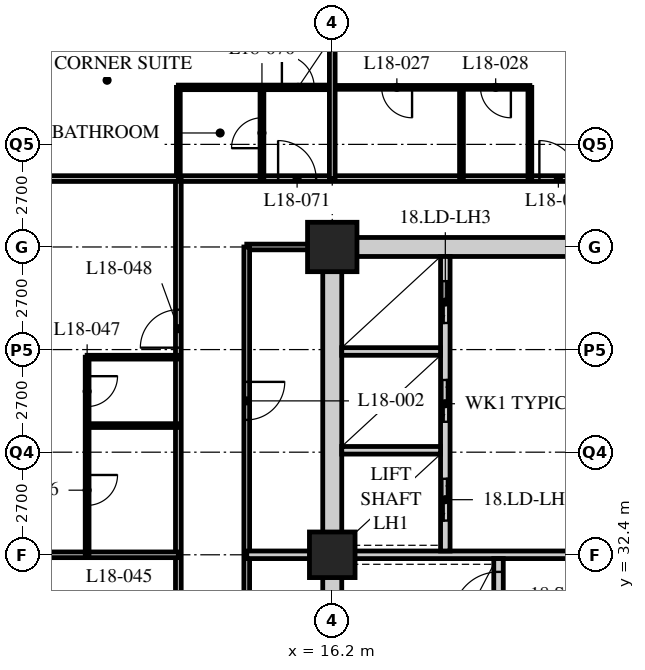
"""IFC4 building model, lengths in metres.
Left out: names, types, materials, properties, quantities, classifications, styles, units other than length and angle.
Written with IfcOpenShell. Run it as: python <this file> out.ifc"""

import sys

from ifc_helpers import new_model, si_unit, direction, frame, frame_2d, origin, origin_2d, place, context, subcontext, project, spatial, rectangle, hollow_rectangle, extrude, element, fill, save


model = new_model("IFC4")
c1 = context("Model", 3, precision=1e-05, world=origin(), true_north=direction((0.0, 1.0)))
c2 = subcontext(c1, "Body", "Model", "MODEL_VIEW")
j1 = project(units=[si_unit("LENGTHUNIT", "METRE"), si_unit("PLANEANGLEUNIT", "RADIAN")], contexts=[c1])
p1 = place(None, origin())
s1 = spatial("IfcSite", under=j1, at=p1, CompositionType="ELEMENT")
p2 = place(p1, origin())
s2 = spatial("IfcBuilding", under=s1, at=p2, CompositionType="ELEMENT")
p3 = place(p2, frame((0.0, 0.0, 73.8)))
s3 = spatial("IfcBuildingStorey", under=s2, at=p3, CompositionType="ELEMENT", Elevation=73.8)
p4 = place(p3, frame((16.2, 32.4, 0.0), z_axis=(0.0, 0.0, 1.0), x_axis=(1.0, 0.0, 0.0)))
e1 = element("IfcColumn", 1, at=p4, inside=s3, PredefinedType="COLUMN", context=c2, shape_type="SweptSolid", body=[
    extrude(hollow_rectangle(XDim=1.2, YDim=1.2, WallThickness=0.12, at=origin_2d()), origin(), (0.0, 0.0, 1.0), 3.4),
])
p5 = place(p3, frame((16.2, 40.5, 0.0), z_axis=(0.0, 0.0, 1.0), x_axis=(1.0, 0.0, 0.0)))
e2 = element("IfcColumn", 2, at=p5, inside=s3, PredefinedType="COLUMN", context=c2, shape_type="SweptSolid", body=[
    extrude(hollow_rectangle(XDim=1.3, YDim=1.3, WallThickness=0.13, at=origin_2d()), origin(), (0.0, 0.0, 1.0), 3.4),
])
p6 = place(p3, frame((12.15, 42.3, 0.0), z_axis=(0.0, 0.0, 1.0), x_axis=(1.0, 0.0, 0.0)))
e3 = element("IfcWall", 3, at=p6, inside=s3, PredefinedType="PARTITIONING", context=c2, shape_type="SweptSolid", body=[
    extrude(rectangle(XDim=36.45, YDim=0.15, at=frame_2d((18.225, 0.0))), origin(), (0.0, 0.0, 1.0), 3.19),
])
p7 = place(p6, frame((9.5, 0.0, 0.0)))
e4 = element("IfcOpeningElement", 4, at=p7, cuts=e3, PredefinedType="OPENING", context=c2, shape_type="SweptSolid", body=[
    extrude(rectangle(XDim=1.0, YDim=2.1, at=frame_2d((0.5, 1.05))), frame((0.0, 0.085, 0.0), z_axis=(0.0, -1.0, 0.0), x_axis=(1.0, 0.0, 0.0)), (0.0, 0.0, 1.0), 0.17),
])
p8 = place(p6, frame((17.6, 0.0, 0.0)))
e5 = element("IfcOpeningElement", 5, at=p8, cuts=e3, PredefinedType="OPENING", context=c2, shape_type="SweptSolid", body=[
    extrude(rectangle(XDim=1.0, YDim=2.1, at=frame_2d((0.5, 1.05))), frame((0.0, 0.085, 0.0), z_axis=(0.0, -1.0, 0.0), x_axis=(1.0, 0.0, 0.0)), (0.0, 0.0, 1.0), 0.17),
])
p9 = place(p6, frame((22.7, 0.0, 0.0)))
e6 = element("IfcOpeningElement", 6, at=p9, cuts=e3, PredefinedType="OPENING", context=c2, shape_type="SweptSolid", body=[
    extrude(rectangle(XDim=1.0, YDim=2.1, at=frame_2d((0.5, 1.05))), frame((0.0, 0.085, 0.0), z_axis=(0.0, -1.0, 0.0), x_axis=(1.0, 0.0, 0.0)), (0.0, 0.0, 1.0), 0.17),
])
p10 = place(p6, frame((26.75, 0.0, 0.0)))
e7 = element("IfcOpeningElement", 7, at=p10, cuts=e3, PredefinedType="OPENING", context=c2, shape_type="SweptSolid", body=[
    extrude(rectangle(XDim=1.0, YDim=2.1, at=frame_2d((0.5, 1.05))), frame((0.0, 0.085, 0.0), z_axis=(0.0, -1.0, 0.0), x_axis=(1.0, 0.0, 0.0)), (0.0, 0.0, 1.0), 0.17),
])
p11 = place(p6, frame((30.8, 0.0, 0.0)))
e8 = element("IfcOpeningElement", 8, at=p11, cuts=e3, PredefinedType="OPENING", context=c2, shape_type="SweptSolid", body=[
    extrude(rectangle(XDim=1.0, YDim=2.1, at=frame_2d((0.5, 1.05))), frame((0.0, 0.085, 0.0), z_axis=(0.0, -1.0, 0.0), x_axis=(1.0, 0.0, 0.0)), (0.0, 0.0, 1.0), 0.17),
])
p12 = place(p6, frame((32.825, 0.0, 0.0)))
e9 = element("IfcOpeningElement", 9, at=p12, cuts=e3, PredefinedType="OPENING", context=c2, shape_type="SweptSolid", body=[
    extrude(rectangle(XDim=1.0, YDim=2.1, at=frame_2d((0.5, 1.05))), frame((0.0, 0.085, 0.0), z_axis=(0.0, -1.0, 0.0), x_axis=(1.0, 0.0, 0.0)), (0.0, 0.0, 1.0), 0.17),
])
p13 = place(p6, frame((2.625, 0.0, 0.0)))
e10 = element("IfcOpeningElement", 10, at=p13, cuts=e3, PredefinedType="OPENING", context=c2, shape_type="SweptSolid", body=[
    extrude(rectangle(XDim=1.0, YDim=2.1, at=frame_2d((0.5, 1.05))), frame((0.0, 0.085, 0.0), z_axis=(0.0, -1.0, 0.0), x_axis=(1.0, 0.0, 0.0)), (0.0, 0.0, 1.0), 0.17),
])
p14 = place(p3, frame((12.15, 16.2, 0.0), z_axis=(0.0, 0.0, 1.0), x_axis=(0.0, 1.0, 0.0)))
e11 = element("IfcWall", 11, at=p14, inside=s3, PredefinedType="PARTITIONING", context=c2, shape_type="SweptSolid", body=[
    extrude(rectangle(XDim=26.1, YDim=0.15, at=frame_2d((13.05, 0.0))), origin(), (0.0, 0.0, 1.0), 3.19),
])
p15 = place(p14, frame((0.3, 0.0, 0.0)))
e12 = element("IfcOpeningElement", 12, at=p15, cuts=e11, PredefinedType="OPENING", context=c2, shape_type="SweptSolid", body=[
    extrude(rectangle(XDim=1.0, YDim=2.1, at=frame_2d((0.5, 1.05))), frame((0.0, 0.085, 0.0), z_axis=(0.0, -1.0, 0.0), x_axis=(1.0, 0.0, 0.0)), (0.0, 0.0, 1.0), 0.17),
])
p16 = place(p14, frame((6.5, 0.0, 0.0)))
e13 = element("IfcOpeningElement", 13, at=p16, cuts=e11, PredefinedType="OPENING", context=c2, shape_type="SweptSolid", body=[
    extrude(rectangle(XDim=1.0, YDim=2.1, at=frame_2d((0.5, 1.05))), frame((0.0, 0.085, 0.0), z_axis=(0.0, -1.0, 0.0), x_axis=(1.0, 0.0, 0.0)), (0.0, 0.0, 1.0), 0.17),
])
p17 = place(p14, frame((13.55, 0.0, 0.0)))
e14 = element("IfcOpeningElement", 14, at=p17, cuts=e11, PredefinedType="OPENING", context=c2, shape_type="SweptSolid", body=[
    extrude(rectangle(XDim=1.0, YDim=2.1, at=frame_2d((0.5, 1.05))), frame((0.0, 0.085, 0.0), z_axis=(0.0, -1.0, 0.0), x_axis=(1.0, 0.0, 0.0)), (0.0, 0.0, 1.0), 0.17),
])
p18 = place(p14, frame((21.65, 0.0, 0.0)))
e15 = element("IfcOpeningElement", 15, at=p18, cuts=e11, PredefinedType="OPENING", context=c2, shape_type="SweptSolid", body=[
    extrude(rectangle(XDim=1.0, YDim=2.1, at=frame_2d((0.5, 1.05))), frame((0.0, 0.085, 0.0), z_axis=(0.0, -1.0, 0.0), x_axis=(1.0, 0.0, 0.0)), (0.0, 0.0, 1.0), 0.17),
])
p19 = place(p3, frame((16.0, 40.5, 0.0), z_axis=(0.0, 0.0, 1.0), x_axis=(-1.0, 0.0, 0.0)))
e16 = element("IfcWall", 16, at=p19, inside=s3, PredefinedType="PARTITIONING", context=c2, shape_type="SweptSolid", body=[
    extrude(rectangle(XDim=2.05, YDim=0.15, at=frame_2d((1.025, 0.0))), origin(), (0.0, 0.0, 1.0), 2.578),
])
p20 = place(p3, frame((13.95, 40.5, 0.0), z_axis=(0.0, 0.0, 1.0), x_axis=(0.0, -1.0, 0.0)))
e17 = element("IfcWall", 17, at=p20, inside=s3, PredefinedType="PARTITIONING", context=c2, shape_type="SweptSolid", body=[
    extrude(rectangle(XDim=22.5, YDim=0.15, at=frame_2d((11.25, 0.0))), origin(), (0.0, 0.0, 1.0), 3.19),
])
p21 = place(p20, frame((11.65, 0.0, 0.0)))
e18 = element("IfcOpeningElement", 18, at=p21, cuts=e17, PredefinedType="OPENING", context=c2, shape_type="SweptSolid", body=[
    extrude(rectangle(XDim=1.0, YDim=2.1, at=frame_2d((0.5, 1.05))), frame((0.0, 0.085, 0.0), z_axis=(0.0, -1.0, 0.0), x_axis=(1.0, 0.0, 0.0)), (0.0, 0.0, 1.0), 0.17),
])
p22 = place(p20, frame((3.55, 0.0, 0.0)))
e19 = element("IfcOpeningElement", 19, at=p22, cuts=e17, PredefinedType="OPENING", context=c2, shape_type="SweptSolid", body=[
    extrude(rectangle(XDim=1.0, YDim=2.1, at=frame_2d((0.5, 1.05))), frame((0.0, 0.085, 0.0), z_axis=(0.0, -1.0, 0.0), x_axis=(1.0, 0.0, 0.0)), (0.0, 0.0, 1.0), 0.17),
])
p23 = place(p3, frame((13.95, 32.4, 0.0), z_axis=(0.0, 0.0, 1.0), x_axis=(1.0, 0.0, 0.0)))
e20 = element("IfcWall", 20, at=p23, inside=s3, PredefinedType="SOLIDWALL", context=c2, shape_type="SweptSolid", body=[
    extrude(rectangle(XDim=2.25, YDim=0.2, at=frame_2d((1.125, 0.0))), origin(), (0.0, 0.0, 1.0), 2.578),
])
p24 = place(p3, frame((16.2, 44.7, 0.0), z_axis=(0.0, 0.0, 1.0), x_axis=(1.0, 0.0, 0.0)))
e21 = element("IfcWall", 21, at=p24, inside=s3, PredefinedType="PARTITIONING", context=c2, shape_type="SweptSolid", body=[
    extrude(rectangle(XDim=5.2, YDim=0.1, at=frame_2d((2.6, 0.0))), origin(), (0.0, 0.0, 1.0), 3.19),
])
p25 = place(p24, frame((1.3, 0.0, 0.0)))
e22 = element("IfcOpeningElement", 22, at=p25, cuts=e21, PredefinedType="OPENING", context=c2, shape_type="SweptSolid", body=[
    extrude(rectangle(XDim=0.8, YDim=2.1, at=frame_2d((0.4, 1.05))), frame((0.0, 0.06, 0.0), z_axis=(0.0, -1.0, 0.0), x_axis=(1.0, 0.0, 0.0)), (0.0, 0.0, 1.0), 0.12),
])
p26 = place(p24, frame((3.9, 0.0, 0.0)))
e23 = element("IfcOpeningElement", 23, at=p26, cuts=e21, PredefinedType="OPENING", context=c2, shape_type="SweptSolid", body=[
    extrude(rectangle(XDim=0.8, YDim=2.1, at=frame_2d((0.4, 1.05))), frame((0.0, 0.06, 0.0), z_axis=(0.0, -1.0, 0.0), x_axis=(1.0, 0.0, 0.0)), (0.0, 0.0, 1.0), 0.12),
])
for number, where, z_axis, x_axis in (
    (24, (19.6, 42.3, 0.0), (0.0, 0.0, 1.0), (0.0, 1.0, 0.0)),
    (25, (21.4, 42.3, 0.0), (0.0, 0.0, 1.0), (0.0, 1.0, 0.0)),
):
    element("IfcWall", number, at=place(p3, frame(where, z_axis=z_axis, x_axis=x_axis)), inside=s3, PredefinedType="PARTITIONING", context=c2, shape_type="SweptSolid", body=[
        extrude(rectangle(XDim=2.4, YDim=0.1, at=frame_2d((1.2, 0.0))), origin(), (0.0, 0.0, 1.0), 3.19),
    ])
p27 = place(p3, frame((12.15, 32.4, 0.0), z_axis=(0.0, 0.0, 1.0), x_axis=(-1.0, 0.0, 0.0)))
e26 = element("IfcWall", 26, at=p27, inside=s3, PredefinedType="PARTITIONING", context=c2, shape_type="SweptSolid", body=[
    extrude(rectangle(XDim=11.85, YDim=0.15, at=frame_2d((5.925, 0.0))), origin(), (0.0, 0.0, 1.0), 2.578),
])
p28 = place(p3, frame((9.75, 32.4, 0.0), z_axis=(0.0, 0.0, 1.0), x_axis=(0.0, 1.0, 0.0)))
e27 = element("IfcWall", 27, at=p28, inside=s3, PredefinedType="PARTITIONING", context=c2, shape_type="SweptSolid", body=[
    extrude(rectangle(XDim=5.2, YDim=0.1, at=frame_2d((2.6, 0.0))), origin(), (0.0, 0.0, 1.0), 3.19),
])
p29 = place(p28, frame((1.3, 0.0, 0.0)))
e28 = element("IfcOpeningElement", 28, at=p29, cuts=e27, PredefinedType="OPENING", context=c2, shape_type="SweptSolid", body=[
    extrude(rectangle(XDim=0.8, YDim=2.1, at=frame_2d((0.4, 1.05))), frame((0.0, 0.06, 0.0), z_axis=(0.0, -1.0, 0.0), x_axis=(1.0, 0.0, 0.0)), (0.0, 0.0, 1.0), 0.12),
])
p30 = place(p28, frame((3.9, 0.0, 0.0)))
e29 = element("IfcOpeningElement", 29, at=p30, cuts=e27, PredefinedType="OPENING", context=c2, shape_type="SweptSolid", body=[
    extrude(rectangle(XDim=0.8, YDim=2.1, at=frame_2d((0.4, 1.05))), frame((0.0, 0.06, 0.0), z_axis=(0.0, -1.0, 0.0), x_axis=(1.0, 0.0, 0.0)), (0.0, 0.0, 1.0), 0.12),
])
for number, where, z_axis, x_axis in (
    (30, (12.15, 35.8, 0.0), (0.0, 0.0, 1.0), (-1.0, 0.0, 0.0)),
    (31, (12.15, 37.6, 0.0), (0.0, 0.0, 1.0), (-1.0, 0.0, 0.0)),
):
    element("IfcWall", number, at=place(p3, frame(where, z_axis=z_axis, x_axis=x_axis)), inside=s3, PredefinedType="PARTITIONING", context=c2, shape_type="SweptSolid", body=[
        extrude(rectangle(XDim=2.4, YDim=0.1, at=frame_2d((1.2, 0.0))), origin(), (0.0, 0.0, 1.0), 3.19),
    ])
p31 = place(p3, frame((12.15, 44.7, 0.0), z_axis=(0.0, 0.0, 1.0), x_axis=(1.0, 0.0, 0.0)))
e32 = element("IfcWall", 32, at=p31, inside=s3, PredefinedType="PARTITIONING", context=c2, shape_type="SweptSolid", body=[
    extrude(rectangle(XDim=4.05, YDim=0.12, at=frame_2d((2.025, 0.0))), origin(), (0.0, 0.0, 1.0), 3.19),
])
p32 = place(p31, frame((2.725, 0.0, 0.0)))
e33 = element("IfcOpeningElement", 33, at=p32, cuts=e32, PredefinedType="OPENING", context=c2, shape_type="SweptSolid", body=[
    extrude(rectangle(XDim=0.85, YDim=2.1, at=frame_2d((0.425, 1.05))), frame((0.0, 0.07, 0.0), z_axis=(0.0, -1.0, 0.0), x_axis=(1.0, 0.0, 0.0)), (0.0, 0.0, 1.0), 0.14),
])
p33 = place(p3, frame((14.35, 42.3, 0.0), z_axis=(0.0, 0.0, 1.0), x_axis=(0.0, 1.0, 0.0)))
e34 = element("IfcWall", 34, at=p33, inside=s3, PredefinedType="PARTITIONING", context=c2, shape_type="SweptSolid", body=[
    extrude(rectangle(XDim=2.4, YDim=0.1, at=frame_2d((1.2, 0.0))), origin(), (0.0, 0.0, 1.0), 3.19),
])
p34 = place(p33, frame((0.8, 0.0, 0.0)))
e35 = element("IfcOpeningElement", 35, at=p34, cuts=e34, PredefinedType="OPENING", context=c2, shape_type="SweptSolid", body=[
    extrude(rectangle(XDim=0.8, YDim=2.1, at=frame_2d((0.4, 1.05))), frame((0.0, 0.06, 0.0), z_axis=(0.0, -1.0, 0.0), x_axis=(1.0, 0.0, 0.0)), (0.0, 0.0, 1.0), 0.12),
])
p35 = place(p3, frame((12.15, 42.3, 0.0), z_axis=(0.0, 0.0, 1.0), x_axis=(0.0, 1.0, 0.0)))
e36 = element("IfcWall", 36, at=p35, inside=s3, PredefinedType="PARTITIONING", context=c2, shape_type="SweptSolid", body=[
    extrude(rectangle(XDim=2.4, YDim=0.1, at=frame_2d((1.2, 0.0))), origin(), (0.0, 0.0, 1.0), 3.19),
])
p36 = place(p3, frame((4.35, 42.3, 0.0), z_axis=(0.0, 0.0, 1.0), x_axis=(1.0, 0.0, 0.0)))
e37 = element("IfcWall", 37, at=p36, inside=s3, PredefinedType="PARTITIONING", context=c2, shape_type="SweptSolid", body=[
    extrude(rectangle(XDim=7.8, YDim=0.15, at=frame_2d((3.9, 0.0))), origin(), (0.0, 0.0, 1.0), 3.19),
])
p37 = place(p3, frame((16.2, 42.3, 0.0), z_axis=(0.0, 0.0, 1.0), x_axis=(0.0, 1.0, 0.0)))
e38 = element("IfcWall", 38, at=p37, inside=s3, PredefinedType="PARTITIONING", context=c2, shape_type="SweptSolid", body=[
    extrude(rectangle(XDim=6.0, YDim=0.15, at=frame_2d((3.0, 0.0))), origin(), (0.0, 0.0, 1.0), 2.578),
])
p38 = place(p3, frame((15.95, 40.5, 0.0), z_axis=(0.0, 0.0, 1.0), x_axis=(1.0, 0.0, 0.0)))
e39 = element("IfcWall", 39, at=p38, inside=s3, PredefinedType="SOLIDWALL", context=c2, shape_type="SweptSolid", body=[
    extrude(rectangle(XDim=24.8, YDim=0.5, at=frame_2d((12.4, 0.0))), origin(), (0.0, 0.0, 1.0), 2.54),
])
p39 = place(p38, frame((11.5, 0.0, 0.0)))
e40 = element("IfcOpeningElement", 40, at=p39, cuts=e39, PredefinedType="OPENING", context=c2, shape_type="SweptSolid", body=[
    extrude(rectangle(XDim=1.8, YDim=2.4, at=frame_2d((0.9, 1.2))), frame((0.0, 0.26, 0.0), z_axis=(0.0, -1.0, 0.0), x_axis=(1.0, 0.0, 0.0)), (0.0, 0.0, 1.0), 0.52),
])
p40 = place(p3, frame((16.2, 24.55, 0.0), z_axis=(0.0, 0.0, 1.0), x_axis=(0.0, 1.0, 0.0)))
e41 = element("IfcWall", 41, at=p40, inside=s3, PredefinedType="SOLIDWALL", context=c2, shape_type="SweptSolid", body=[
    extrude(rectangle(XDim=15.7, YDim=0.5, at=frame_2d((7.85, 0.0))), origin(), (0.0, 0.0, 1.0), 2.578),
])
p41 = place(p3, frame((16.45, 32.4, 0.0), z_axis=(0.0, 0.0, 1.0), x_axis=(1.0, 0.0, 0.0)))
e42 = element("IfcWall", 42, at=p41, inside=s3, PredefinedType="SOLIDWALL", context=c2, shape_type="SweptSolid", body=[
    extrude(rectangle(XDim=7.95, YDim=0.2, at=frame_2d((3.975, 0.0))), origin(), (0.0, 0.0, 1.0), 2.578),
])
p42 = place(p3, frame((20.575, 24.55, 0.0), z_axis=(0.0, 0.0, 1.0), x_axis=(0.0, 1.0, 0.0)))
e43 = element("IfcWall", 43, at=p42, inside=s3, PredefinedType="SOLIDWALL", context=c2, shape_type="SweptSolid", body=[
    extrude(rectangle(XDim=7.75, YDim=0.25, at=frame_2d((3.875, 0.0))), origin(), (0.0, 0.0, 1.0), 3.19),
])
p43 = place(p42, frame((6.2, 0.0, 0.0)))
e44 = element("IfcOpeningElement", 44, at=p43, cuts=e43, PredefinedType="OPENING", context=c2, shape_type="SweptSolid", body=[
    extrude(rectangle(XDim=1.2, YDim=2.1, at=frame_2d((0.6, 1.05))), frame((0.0, 0.135, 0.0), z_axis=(0.0, -1.0, 0.0), x_axis=(1.0, 0.0, 0.0)), (0.0, 0.0, 1.0), 0.27),
])
p44 = place(p3, frame((19.175, 32.5, 0.0), z_axis=(0.0, 0.0, 1.0), x_axis=(0.0, 1.0, 0.0)))
e45 = element("IfcWall", 45, at=p44, inside=s3, PredefinedType="SOLIDWALL", context=c2, shape_type="SweptSolid", body=[
    extrude(rectangle(XDim=7.75, YDim=0.25, at=frame_2d((3.875, 0.0))), origin(), (0.0, 0.0, 1.0), 3.19),
])
p45 = place(p44, frame((0.8, 0.0, 0.0)))
e46 = element("IfcOpeningElement", 46, at=p45, cuts=e45, PredefinedType="OPENING", context=c2, shape_type="SweptSolid", body=[
    extrude(rectangle(XDim=1.1, YDim=2.4, at=frame_2d((0.55, 1.2))), frame((0.0, 0.135, 0.0), z_axis=(0.0, -1.0, 0.0), x_axis=(1.0, 0.0, 0.0)), (0.0, 0.0, 1.0), 0.27),
])
p46 = place(p44, frame((3.4, 0.0, 0.0)))
e47 = element("IfcOpeningElement", 47, at=p46, cuts=e45, PredefinedType="OPENING", context=c2, shape_type="SweptSolid", body=[
    extrude(rectangle(XDim=1.1, YDim=2.4, at=frame_2d((0.55, 1.2))), frame((0.0, 0.135, 0.0), z_axis=(0.0, -1.0, 0.0), x_axis=(1.0, 0.0, 0.0)), (0.0, 0.0, 1.0), 0.27),
])
p47 = place(p44, frame((6.0, 0.0, 0.0)))
e48 = element("IfcOpeningElement", 48, at=p47, cuts=e45, PredefinedType="OPENING", context=c2, shape_type="SweptSolid", body=[
    extrude(rectangle(XDim=1.1, YDim=2.4, at=frame_2d((0.55, 1.2))), frame((0.0, 0.135, 0.0), z_axis=(0.0, -1.0, 0.0), x_axis=(1.0, 0.0, 0.0)), (0.0, 0.0, 1.0), 0.27),
])
for number, where, z_axis, x_axis in (
    (49, (16.45, 35.15, 0.0), (0.0, 0.0, 1.0), (1.0, 0.0, 0.0)),
    (50, (16.45, 37.75, 0.0), (0.0, 0.0, 1.0), (1.0, 0.0, 0.0)),
):
    element("IfcWall", number, at=place(p3, frame(where, z_axis=z_axis, x_axis=x_axis)), inside=s3, PredefinedType="SOLIDWALL", context=c2, shape_type="SweptSolid", body=[
        extrude(rectangle(XDim=2.6, YDim=0.2, at=frame_2d((1.3, 0.0))), origin(), (0.0, 0.0, 1.0), 3.19),
    ])
p48 = place(p22, origin())
e51 = element("IfcDoor", 51, at=p48, inside=s3, OperationType="SINGLE_SWING_LEFT", PredefinedType="DOOR", context=c2, shape_type="SweptSolid", body=[
    extrude(rectangle(XDim=1.0, YDim=2.1, at=frame_2d((0.5, 1.05))), frame((0.0, 0.025, 0.0), z_axis=(0.0, -1.0, 0.0), x_axis=(1.0, 0.0, 0.0)), (0.0, 0.0, 1.0), 0.05),
])
fill(e19, e51)
p49 = place(p25, origin())
e52 = element("IfcDoor", 52, at=p49, inside=s3, OperationType="SINGLE_SWING_LEFT", PredefinedType="DOOR", context=c2, shape_type="SweptSolid", body=[
    extrude(rectangle(XDim=0.8, YDim=2.1, at=frame_2d((0.4, 1.05))), frame((0.0, 0.025, 0.0), z_axis=(0.0, -1.0, 0.0), x_axis=(1.0, 0.0, 0.0)), (0.0, 0.0, 1.0), 0.05),
])
fill(e22, e52)
p50 = place(p26, origin())
e53 = element("IfcDoor", 53, at=p50, inside=s3, OperationType="SINGLE_SWING_LEFT", PredefinedType="DOOR", context=c2, shape_type="SweptSolid", body=[
    extrude(rectangle(XDim=0.8, YDim=2.1, at=frame_2d((0.4, 1.05))), frame((0.0, 0.025, 0.0), z_axis=(0.0, -1.0, 0.0), x_axis=(1.0, 0.0, 0.0)), (0.0, 0.0, 1.0), 0.05),
])
fill(e23, e53)
p51 = place(p7, origin())
e54 = element("IfcDoor", 54, at=p51, inside=s3, OperationType="SINGLE_SWING_LEFT", PredefinedType="DOOR", context=c2, shape_type="SweptSolid", body=[
    extrude(rectangle(XDim=1.0, YDim=2.1, at=frame_2d((0.5, 1.05))), frame((0.0, 0.025, 0.0), z_axis=(0.0, -1.0, 0.0), x_axis=(1.0, 0.0, 0.0)), (0.0, 0.0, 1.0), 0.05),
])
fill(e4, e54)
p52 = place(p29, origin())
e55 = element("IfcDoor", 55, at=p52, inside=s3, OperationType="SINGLE_SWING_LEFT", PredefinedType="DOOR", context=c2, shape_type="SweptSolid", body=[
    extrude(rectangle(XDim=0.8, YDim=2.1, at=frame_2d((0.4, 1.05))), frame((0.0, 0.025, 0.0), z_axis=(0.0, -1.0, 0.0), x_axis=(1.0, 0.0, 0.0)), (0.0, 0.0, 1.0), 0.05),
])
fill(e28, e55)
p53 = place(p30, origin())
e56 = element("IfcDoor", 56, at=p53, inside=s3, OperationType="SINGLE_SWING_LEFT", PredefinedType="DOOR", context=c2, shape_type="SweptSolid", body=[
    extrude(rectangle(XDim=0.8, YDim=2.1, at=frame_2d((0.4, 1.05))), frame((0.0, 0.025, 0.0), z_axis=(0.0, -1.0, 0.0), x_axis=(1.0, 0.0, 0.0)), (0.0, 0.0, 1.0), 0.05),
])
fill(e29, e56)
p54 = place(p18, origin())
e57 = element("IfcDoor", 57, at=p54, inside=s3, OperationType="SINGLE_SWING_LEFT", PredefinedType="DOOR", context=c2, shape_type="SweptSolid", body=[
    extrude(rectangle(XDim=1.0, YDim=2.1, at=frame_2d((0.5, 1.05))), frame((0.0, 0.025, 0.0), z_axis=(0.0, -1.0, 0.0), x_axis=(1.0, 0.0, 0.0)), (0.0, 0.0, 1.0), 0.05),
])
fill(e15, e57)
p55 = place(p34, origin())
e58 = element("IfcDoor", 58, at=p55, inside=s3, OperationType="SINGLE_SWING_LEFT", PredefinedType="DOOR", context=c2, shape_type="SweptSolid", body=[
    extrude(rectangle(XDim=0.8, YDim=2.1, at=frame_2d((0.4, 1.05))), frame((0.0, 0.025, 0.0), z_axis=(0.0, -1.0, 0.0), x_axis=(1.0, 0.0, 0.0)), (0.0, 0.0, 1.0), 0.05),
])
fill(e35, e58)
p56 = place(p13, origin())
e59 = element("IfcDoor", 59, at=p56, inside=s3, OperationType="SINGLE_SWING_LEFT", PredefinedType="DOOR", context=c2, shape_type="SweptSolid", body=[
    extrude(rectangle(XDim=1.0, YDim=2.1, at=frame_2d((0.5, 1.05))), frame((0.0, 0.025, 0.0), z_axis=(0.0, -1.0, 0.0), x_axis=(1.0, 0.0, 0.0)), (0.0, 0.0, 1.0), 0.05),
])
fill(e10, e59)
p57 = place(p32, origin())
e60 = element("IfcDoor", 60, at=p57, inside=s3, OperationType="SINGLE_SWING_LEFT", PredefinedType="DOOR", context=c2, shape_type="SweptSolid", body=[
    extrude(rectangle(XDim=0.85, YDim=2.1, at=frame_2d((0.425, 1.05))), frame((0.0, 0.025, 0.0), z_axis=(0.0, -1.0, 0.0), x_axis=(1.0, 0.0, 0.0)), (0.0, 0.0, 1.0), 0.05),
])
fill(e33, e60)
p58 = place(p43, origin())
e61 = element("IfcDoor", 61, at=p58, inside=s3, OperationType="SINGLE_SWING_LEFT", PredefinedType="DOOR", context=c2, shape_type="SweptSolid", body=[
    extrude(rectangle(XDim=1.2, YDim=2.1, at=frame_2d((0.6, 1.05))), frame((0.0, 0.025, 0.0), z_axis=(0.0, -1.0, 0.0), x_axis=(1.0, 0.0, 0.0)), (0.0, 0.0, 1.0), 0.05),
])
fill(e44, e61)
p59 = place(p45, origin())
e62 = element("IfcDoor", 62, at=p59, inside=s3, OperationType="DOUBLE_DOOR_SLIDING", PredefinedType="DOOR", context=c2, shape_type="SweptSolid", body=[
    extrude(rectangle(XDim=1.1, YDim=2.4, at=frame_2d((0.55, 1.2))), frame((0.0, 0.025, 0.0), z_axis=(0.0, -1.0, 0.0), x_axis=(1.0, 0.0, 0.0)), (0.0, 0.0, 1.0), 0.05),
])
fill(e46, e62)
p60 = place(p46, origin())
e63 = element("IfcDoor", 63, at=p60, inside=s3, OperationType="DOUBLE_DOOR_SLIDING", PredefinedType="DOOR", context=c2, shape_type="SweptSolid", body=[
    extrude(rectangle(XDim=1.1, YDim=2.4, at=frame_2d((0.55, 1.2))), frame((0.0, 0.025, 0.0), z_axis=(0.0, -1.0, 0.0), x_axis=(1.0, 0.0, 0.0)), (0.0, 0.0, 1.0), 0.05),
])
fill(e47, e63)
p61 = place(p47, origin())
e64 = element("IfcDoor", 64, at=p61, inside=s3, OperationType="DOUBLE_DOOR_SLIDING", PredefinedType="DOOR", context=c2, shape_type="SweptSolid", body=[
    extrude(rectangle(XDim=1.1, YDim=2.4, at=frame_2d((0.55, 1.2))), frame((0.0, 0.025, 0.0), z_axis=(0.0, -1.0, 0.0), x_axis=(1.0, 0.0, 0.0)), (0.0, 0.0, 1.0), 0.05),
])
fill(e48, e64)
save(model, sys.argv[1])
